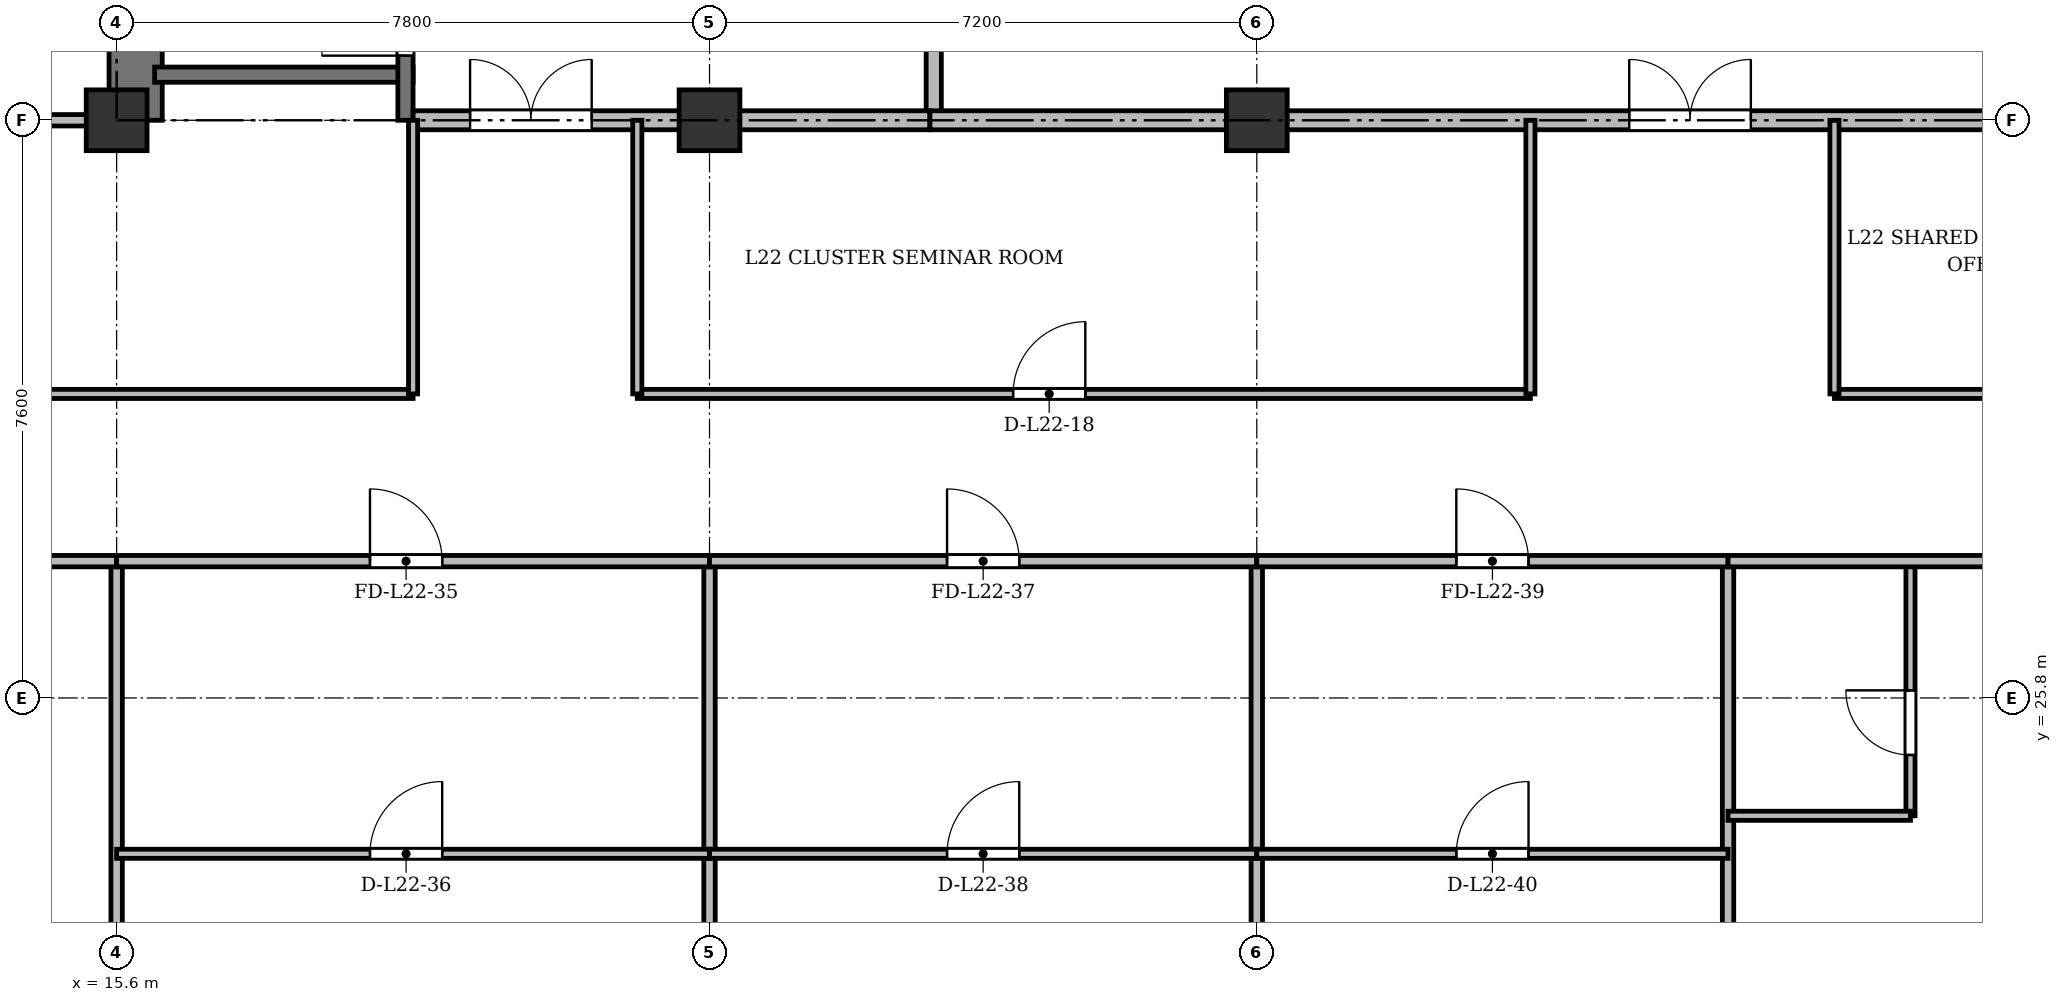
"""IFC4 building model, lengths in metres.
Left out: names, types, materials, properties, quantities, classifications, styles, units other than length and angle.
Written with IfcOpenShell. Run it as: python <this file> out.ifc"""

import sys

from ifc_helpers import new_model, si_unit, direction, frame, frame_2d, origin, origin_2d, place, context, subcontext, project, spatial, rectangle, extrude, source, transform, mapped, element, fill, save


model = new_model("IFC4")
c1 = context("Model", 3, precision=1e-05, world=origin(), true_north=direction((0.0, 1.0)))
c2 = subcontext(c1, "Body", "Model", "MODEL_VIEW")
j1 = project(units=[si_unit("LENGTHUNIT", "METRE"), si_unit("PLANEANGLEUNIT", "RADIAN")], contexts=[c1])
p1 = place(None, origin())
s1 = spatial("IfcSite", under=j1, at=p1, CompositionType="ELEMENT")
p2 = place(p1, origin())
s2 = spatial("IfcBuilding", under=s1, at=p2, CompositionType="ELEMENT")
p3 = place(p2, frame((0.0, 0.0, 88.9)))
s3 = spatial("IfcBuildingStorey", under=s2, at=p3, CompositionType="ELEMENT", Elevation=88.9)
m1 = source(origin(), c2, "Body", "SweptSolid", [
    extrude(rectangle(XDim=0.8, YDim=0.8, at=origin_2d()), origin(), (0.0, 0.0, 1.0), 3.6),
])
for number, where, z_axis, x_axis in (
    (1, (15.6, 33.4, 0.0), (0.0, 0.0, 1.0), (1.0, 0.0, 0.0)),
    (2, (23.4, 33.4, 0.0), (0.0, 0.0, 1.0), (1.0, 0.0, 0.0)),
    (3, (30.6, 33.4, 0.0), (0.0, 0.0, 1.0), (1.0, 0.0, 0.0)),
):
    element("IfcColumn", number, at=place(p3, frame(where, z_axis=z_axis, x_axis=x_axis)), inside=s3, PredefinedType="COLUMN", context=c2, shape_type="MappedRepresentation", body=[
        mapped(m1, transform((0.0, 0.0, 0.0), x_axis=(1.0, 0.0, 0.0), y_axis=(0.0, 1.0, 0.0), z_axis=(0.0, 0.0, 1.0), scale=1.0)),
    ])
p4 = place(p3, frame((15.85, 33.4, 0.0), z_axis=(0.0, 0.0, 1.0), x_axis=(0.0, 1.0, 0.0)))
e4 = element("IfcWall", 4, at=p4, inside=s3, PredefinedType="SHEAR", context=c2, shape_type="SweptSolid", body=[
    extrude(rectangle(XDim=11.7, YDim=0.7, at=frame_2d((5.85, 0.0))), origin(), (0.0, 0.0, 1.0), 3.34),
])
p5 = place(p3, frame((16.1, 34.0, 0.0), z_axis=(0.0, 0.0, 1.0), x_axis=(1.0, 0.0, 0.0)))
e5 = element("IfcWall", 5, at=p5, inside=s3, PredefinedType="SHEAR", context=c2, shape_type="SweptSolid", body=[
    extrude(rectangle(XDim=3.4, YDim=0.2, at=frame_2d((1.7, 0.0))), origin(), (0.0, 0.0, 1.0), 3.34),
])
p6 = place(p3, frame((19.4, 33.4, 0.0), z_axis=(0.0, 0.0, 1.0), x_axis=(0.0, 1.0, 0.0)))
e6 = element("IfcWall", 6, at=p6, inside=s3, PredefinedType="SHEAR", context=c2, shape_type="SweptSolid", body=[
    extrude(rectangle(XDim=11.1, YDim=0.2, at=frame_2d((5.55, 0.0))), origin(), (0.0, 0.0, 1.0), 3.34),
])
p7 = place(p6, frame((0.85, 0.0, 0.0)))
e7 = element("IfcOpeningElement", 7, at=p7, cuts=e6, PredefinedType="OPENING", context=c2, shape_type="SweptSolid", body=[
    extrude(rectangle(XDim=1.1, YDim=2.15, at=frame_2d((0.55, 1.075))), frame((0.0, 0.11, 0.0), z_axis=(0.0, -1.0, 0.0), x_axis=(1.0, 0.0, 0.0)), (0.0, 0.0, 1.0), 0.22),
])
p8 = place(p3, frame((26.35, 33.4, 0.0), z_axis=(0.0, 0.0, 1.0), x_axis=(0.0, 1.0, 0.0)))
e8 = element("IfcWall", 8, at=p8, inside=s3, PredefinedType="SOLIDWALL", context=c2, shape_type="SweptSolid", body=[
    extrude(rectangle(XDim=11.3, YDim=0.2, at=frame_2d((5.65, 0.0))), origin(), (0.0, 0.0, 1.0), 2.752),
])
p9 = place(p3, frame((19.5, 33.4, 0.0), z_axis=(0.0, 0.0, 1.0), x_axis=(1.0, 0.0, 0.0)))
e9 = element("IfcWall", 9, at=p9, inside=s3, PredefinedType="PARTITIONING", context=c2, shape_type="SweptSolid", body=[
    extrude(rectangle(XDim=6.8, YDim=0.25, at=frame_2d((3.4, 0.0))), origin(), (0.0, 0.0, 1.0), 2.752),
])
p10 = place(p9, frame((0.75, 0.0, 0.0)))
e10 = element("IfcOpeningElement", 10, at=p10, cuts=e9, PredefinedType="OPENING", context=c2, shape_type="SweptSolid", body=[
    extrude(rectangle(XDim=1.6, YDim=2.2, at=frame_2d((0.8, 1.1))), frame((0.0, 0.135, 0.0), z_axis=(0.0, -1.0, 0.0), x_axis=(1.0, 0.0, 0.0)), (0.0, 0.0, 1.0), 0.27),
])
p11 = place(p3, frame((26.3, 33.4, 0.0), z_axis=(0.0, 0.0, 1.0), x_axis=(1.0, 0.0, 0.0)))
e11 = element("IfcWall", 11, at=p11, inside=s3, PredefinedType="PARTITIONING", context=c2, shape_type="SweptSolid", body=[
    extrude(rectangle(XDim=20.85, YDim=0.25, at=frame_2d((10.425, 0.0))), origin(), (0.0, 0.0, 1.0), 2.752),
])
p12 = place(p11, frame((9.2, 0.0, 0.0)))
e12 = element("IfcOpeningElement", 12, at=p12, cuts=e11, PredefinedType="OPENING", context=c2, shape_type="SweptSolid", body=[
    extrude(rectangle(XDim=1.6, YDim=2.2, at=frame_2d((0.8, 1.1))), frame((0.0, 0.135, 0.0), z_axis=(0.0, -1.0, 0.0), x_axis=(1.0, 0.0, 0.0)), (0.0, 0.0, 1.0), 0.27),
])
p13 = place(p3, frame((4.75, 29.8, 0.0), z_axis=(0.0, 0.0, 1.0), x_axis=(1.0, 0.0, 0.0)))
e13 = element("IfcWall", 13, at=p13, inside=s3, PredefinedType="PARTITIONING", context=c2, shape_type="SweptSolid", body=[
    extrude(rectangle(XDim=14.75, YDim=0.12, at=frame_2d((7.375, 0.0))), origin(), (0.0, 0.0, 1.0), 2.84),
])
p14 = place(p13, frame((6.9, 0.0, 0.0)))
e14 = element("IfcOpeningElement", 14, at=p14, cuts=e13, PredefinedType="OPENING", context=c2, shape_type="SweptSolid", body=[
    extrude(rectangle(XDim=0.95, YDim=2.15, at=frame_2d((0.475, 1.075))), frame((0.0, 0.07, 0.0), z_axis=(0.0, -1.0, 0.0), x_axis=(1.0, 0.0, 0.0)), (0.0, 0.0, 1.0), 0.14),
])
p15 = place(p3, frame((22.45, 29.8, 0.0), z_axis=(0.0, 0.0, 1.0), x_axis=(1.0, 0.0, 0.0)))
e15 = element("IfcWall", 15, at=p15, inside=s3, PredefinedType="PARTITIONING", context=c2, shape_type="SweptSolid", body=[
    extrude(rectangle(XDim=11.75, YDim=0.12, at=frame_2d((5.875, 0.0))), origin(), (0.0, 0.0, 1.0), 2.84),
])
p16 = place(p15, frame((4.944, 0.0, 0.0)))
e16 = element("IfcOpeningElement", 16, at=p16, cuts=e15, PredefinedType="OPENING", context=c2, shape_type="SweptSolid", body=[
    extrude(rectangle(XDim=0.95, YDim=2.15, at=frame_2d((0.475, 1.075))), frame((0.0, 0.07, 0.0), z_axis=(0.0, -1.0, 0.0), x_axis=(1.0, 0.0, 0.0)), (0.0, 0.0, 1.0), 0.14),
])
p17 = place(p3, frame((38.2, 29.8, 0.0), z_axis=(0.0, 0.0, 1.0), x_axis=(1.0, 0.0, 0.0)))
e17 = element("IfcWall", 17, at=p17, inside=s3, PredefinedType="PARTITIONING", context=c2, shape_type="SweptSolid", body=[
    extrude(rectangle(XDim=8.6, YDim=0.12, at=frame_2d((4.3, 0.0))), origin(), (0.0, 0.0, 1.0), 2.84),
])
p18 = place(p17, frame((3.462, 0.0, 0.0)))
e18 = element("IfcOpeningElement", 18, at=p18, cuts=e17, PredefinedType="OPENING", context=c2, shape_type="SweptSolid", body=[
    extrude(rectangle(XDim=0.95, YDim=2.15, at=frame_2d((0.475, 1.075))), frame((0.0, 0.07, 0.0), z_axis=(0.0, -1.0, 0.0), x_axis=(1.0, 0.0, 0.0)), (0.0, 0.0, 1.0), 0.14),
])
for number, where, z_axis, x_axis in (
    (19, (19.5, 29.8, 0.0), (0.0, 0.0, 1.0), (0.0, 1.0, 0.0)),
    (20, (22.45, 29.8, 0.0), (0.0, 0.0, 1.0), (0.0, 1.0, 0.0)),
    (21, (34.2, 29.8, 0.0), (0.0, 0.0, 1.0), (0.0, 1.0, 0.0)),
    (22, (38.2, 29.8, 0.0), (0.0, 0.0, 1.0), (0.0, 1.0, 0.0)),
):
    element("IfcWall", number, at=place(p3, frame(where, z_axis=z_axis, x_axis=x_axis)), inside=s3, PredefinedType="PARTITIONING", context=c2, shape_type="SweptSolid", body=[
        extrude(rectangle(XDim=3.6, YDim=0.12, at=frame_2d((1.8, 0.0))), origin(), (0.0, 0.0, 1.0), 2.752),
    ])
p19 = place(p3, frame((4.75, 33.4, 0.0), z_axis=(0.0, 0.0, 1.0), x_axis=(1.0, 0.0, 0.0)))
e23 = element("IfcWall", 23, at=p19, inside=s3, PredefinedType="PARTITIONING", context=c2, shape_type="SweptSolid", body=[
    extrude(rectangle(XDim=10.85, YDim=0.15, at=frame_2d((5.425, 0.0))), origin(), (0.0, 0.0, 1.0), 2.752),
])
p20 = place(p19, frame((4.94, 0.0, 0.0)))
e24 = element("IfcOpeningElement", 24, at=p20, cuts=e23, PredefinedType="OPENING", context=c2, shape_type="SweptSolid", body=[
    extrude(rectangle(XDim=0.95, YDim=2.15, at=frame_2d((0.475, 1.075))), frame((0.0, 0.085, 0.0), z_axis=(0.0, -1.0, 0.0), x_axis=(1.0, 0.0, 0.0)), (0.0, 0.0, 1.0), 0.17),
])
for number, where, z_axis, x_axis in (
    (25, (15.6, 3.145, 0.0), (0.0, 0.0, 1.0), (0.0, 1.0, 0.0)),
    (26, (23.4, 3.145, 0.0), (0.0, 0.0, 1.0), (0.0, 1.0, 0.0)),
    (27, (30.6, 3.145, 0.0), (0.0, 0.0, 1.0), (0.0, 1.0, 0.0)),
):
    element("IfcWall", number, at=place(p3, frame(where, z_axis=z_axis, x_axis=x_axis)), inside=s3, PredefinedType="PARTITIONING", context=c2, shape_type="SweptSolid", body=[
        extrude(rectangle(XDim=24.455, YDim=0.15, at=frame_2d((12.228, 0.0))), origin(), (0.0, 0.0, 1.0), 2.84),
    ])
p21 = place(p3, frame((36.8, 3.145, 0.0), z_axis=(0.0, 0.0, 1.0), x_axis=(0.0, 1.0, 0.0)))
e28 = element("IfcWall", 28, at=p21, inside=s3, PredefinedType="PARTITIONING", context=c2, shape_type="SweptSolid", body=[
    extrude(rectangle(XDim=24.455, YDim=0.15, at=frame_2d((12.228, 0.0))), origin(), (0.0, 0.0, 1.0), 2.752),
])
p22 = place(p3, frame((10.6, 27.6, 0.0), z_axis=(0.0, 0.0, 1.0), x_axis=(1.0, 0.0, 0.0)))
e29 = element("IfcWall", 29, at=p22, inside=s3, PredefinedType="PARTITIONING", context=c2, shape_type="SweptSolid", body=[
    extrude(rectangle(XDim=5.0, YDim=0.15, at=frame_2d((2.5, 0.0))), origin(), (0.0, 0.0, 1.0), 2.84),
])
p23 = place(p22, frame((2.025, 0.0, 0.0)))
e30 = element("IfcOpeningElement", 30, at=p23, cuts=e29, PredefinedType="OPENING", context=c2, shape_type="SweptSolid", body=[
    extrude(rectangle(XDim=0.95, YDim=2.15, at=frame_2d((0.475, 1.075))), frame((0.0, 0.085, 0.0), z_axis=(0.0, -1.0, 0.0), x_axis=(1.0, 0.0, 0.0)), (0.0, 0.0, 1.0), 0.17),
])
p24 = place(p3, frame((15.6, 27.6, 0.0), z_axis=(0.0, 0.0, 1.0), x_axis=(1.0, 0.0, 0.0)))
e31 = element("IfcWall", 31, at=p24, inside=s3, PredefinedType="PARTITIONING", context=c2, shape_type="SweptSolid", body=[
    extrude(rectangle(XDim=7.8, YDim=0.15, at=frame_2d((3.9, 0.0))), origin(), (0.0, 0.0, 1.0), 2.84),
])
p25 = place(p24, frame((3.333, 0.0, 0.0)))
e32 = element("IfcOpeningElement", 32, at=p25, cuts=e31, PredefinedType="OPENING", context=c2, shape_type="SweptSolid", body=[
    extrude(rectangle(XDim=0.95, YDim=2.15, at=frame_2d((0.475, 1.075))), frame((0.0, 0.085, 0.0), z_axis=(0.0, -1.0, 0.0), x_axis=(1.0, 0.0, 0.0)), (0.0, 0.0, 1.0), 0.17),
])
p26 = place(p3, frame((15.6, 23.75, 0.0), z_axis=(0.0, 0.0, 1.0), x_axis=(1.0, 0.0, 0.0)))
e33 = element("IfcWall", 33, at=p26, inside=s3, PredefinedType="PARTITIONING", context=c2, shape_type="SweptSolid", body=[
    extrude(rectangle(XDim=7.8, YDim=0.12, at=frame_2d((3.9, 0.0))), origin(), (0.0, 0.0, 1.0), 2.84),
])
p27 = place(p26, frame((3.333, 0.0, 0.0)))
e34 = element("IfcOpeningElement", 34, at=p27, cuts=e33, PredefinedType="OPENING", context=c2, shape_type="SweptSolid", body=[
    extrude(rectangle(XDim=0.95, YDim=2.15, at=frame_2d((0.475, 1.075))), frame((0.0, 0.07, 0.0), z_axis=(0.0, -1.0, 0.0), x_axis=(1.0, 0.0, 0.0)), (0.0, 0.0, 1.0), 0.14),
])
p28 = place(p3, frame((23.4, 27.6, 0.0), z_axis=(0.0, 0.0, 1.0), x_axis=(1.0, 0.0, 0.0)))
e35 = element("IfcWall", 35, at=p28, inside=s3, PredefinedType="PARTITIONING", context=c2, shape_type="SweptSolid", body=[
    extrude(rectangle(XDim=7.2, YDim=0.15, at=frame_2d((3.6, 0.0))), origin(), (0.0, 0.0, 1.0), 2.84),
])
p29 = place(p28, frame((3.125, 0.0, 0.0)))
e36 = element("IfcOpeningElement", 36, at=p29, cuts=e35, PredefinedType="OPENING", context=c2, shape_type="SweptSolid", body=[
    extrude(rectangle(XDim=0.95, YDim=2.15, at=frame_2d((0.475, 1.075))), frame((0.0, 0.085, 0.0), z_axis=(0.0, -1.0, 0.0), x_axis=(1.0, 0.0, 0.0)), (0.0, 0.0, 1.0), 0.17),
])
p30 = place(p3, frame((23.4, 23.75, 0.0), z_axis=(0.0, 0.0, 1.0), x_axis=(1.0, 0.0, 0.0)))
e37 = element("IfcWall", 37, at=p30, inside=s3, PredefinedType="PARTITIONING", context=c2, shape_type="SweptSolid", body=[
    extrude(rectangle(XDim=7.2, YDim=0.12, at=frame_2d((3.6, 0.0))), origin(), (0.0, 0.0, 1.0), 2.84),
])
p31 = place(p30, frame((3.125, 0.0, 0.0)))
e38 = element("IfcOpeningElement", 38, at=p31, cuts=e37, PredefinedType="OPENING", context=c2, shape_type="SweptSolid", body=[
    extrude(rectangle(XDim=0.95, YDim=2.15, at=frame_2d((0.475, 1.075))), frame((0.0, 0.07, 0.0), z_axis=(0.0, -1.0, 0.0), x_axis=(1.0, 0.0, 0.0)), (0.0, 0.0, 1.0), 0.14),
])
p32 = place(p3, frame((30.6, 27.6, 0.0), z_axis=(0.0, 0.0, 1.0), x_axis=(1.0, 0.0, 0.0)))
e39 = element("IfcWall", 39, at=p32, inside=s3, PredefinedType="PARTITIONING", context=c2, shape_type="SweptSolid", body=[
    extrude(rectangle(XDim=6.2, YDim=0.15, at=frame_2d((3.1, 0.0))), origin(), (0.0, 0.0, 1.0), 2.84),
])
p33 = place(p32, frame((2.625, 0.0, 0.0)))
e40 = element("IfcOpeningElement", 40, at=p33, cuts=e39, PredefinedType="OPENING", context=c2, shape_type="SweptSolid", body=[
    extrude(rectangle(XDim=0.95, YDim=2.15, at=frame_2d((0.475, 1.075))), frame((0.0, 0.085, 0.0), z_axis=(0.0, -1.0, 0.0), x_axis=(1.0, 0.0, 0.0)), (0.0, 0.0, 1.0), 0.17),
])
p34 = place(p3, frame((30.6, 23.75, 0.0), z_axis=(0.0, 0.0, 1.0), x_axis=(1.0, 0.0, 0.0)))
e41 = element("IfcWall", 41, at=p34, inside=s3, PredefinedType="PARTITIONING", context=c2, shape_type="SweptSolid", body=[
    extrude(rectangle(XDim=6.2, YDim=0.12, at=frame_2d((3.1, 0.0))), origin(), (0.0, 0.0, 1.0), 2.84),
])
p35 = place(p34, frame((2.625, 0.0, 0.0)))
e42 = element("IfcOpeningElement", 42, at=p35, cuts=e41, PredefinedType="OPENING", context=c2, shape_type="SweptSolid", body=[
    extrude(rectangle(XDim=0.95, YDim=2.15, at=frame_2d((0.475, 1.075))), frame((0.0, 0.07, 0.0), z_axis=(0.0, -1.0, 0.0), x_axis=(1.0, 0.0, 0.0)), (0.0, 0.0, 1.0), 0.14),
])
p36 = place(p3, frame((39.2, 24.25, 0.0), z_axis=(0.0, 0.0, 1.0), x_axis=(0.0, 1.0, 0.0)))
e43 = element("IfcWall", 43, at=p36, inside=s3, PredefinedType="PARTITIONING", context=c2, shape_type="SweptSolid", body=[
    extrude(rectangle(XDim=3.35, YDim=0.12, at=frame_2d((1.675, 0.0))), origin(), (0.0, 0.0, 1.0), 2.99),
])
p37 = place(p36, frame((0.8, 0.0, 0.0)))
e44 = element("IfcOpeningElement", 44, at=p37, cuts=e43, PredefinedType="OPENING", context=c2, shape_type="SweptSolid", body=[
    extrude(rectangle(XDim=0.85, YDim=2.1, at=frame_2d((0.425, 1.05))), frame((0.0, 0.07, 0.0), z_axis=(0.0, -1.0, 0.0), x_axis=(1.0, 0.0, 0.0)), (0.0, 0.0, 1.0), 0.14),
])
p38 = place(p3, frame((36.8, 24.25, 0.0), z_axis=(0.0, 0.0, 1.0), x_axis=(1.0, 0.0, 0.0)))
e45 = element("IfcWall", 45, at=p38, inside=s3, PredefinedType="PARTITIONING", context=c2, shape_type="SweptSolid", body=[
    extrude(rectangle(XDim=2.4, YDim=0.12, at=frame_2d((1.2, 0.0))), origin(), (0.0, 0.0, 1.0), 3.34),
])
p39 = place(p3, frame((36.8, 27.6, 0.0), z_axis=(0.0, 0.0, 1.0), x_axis=(1.0, 0.0, 0.0)))
e46 = element("IfcWall", 46, at=p39, inside=s3, PredefinedType="PARTITIONING", context=c2, shape_type="SweptSolid", body=[
    extrude(rectangle(XDim=7.0, YDim=0.15, at=frame_2d((3.5, 0.0))), origin(), (0.0, 0.0, 1.0), 2.84),
])
p40 = place(p39, frame((4.7, 0.0, 0.0)))
e47 = element("IfcOpeningElement", 47, at=p40, cuts=e46, PredefinedType="OPENING", context=c2, shape_type="SweptSolid", body=[
    extrude(rectangle(XDim=0.95, YDim=2.15, at=frame_2d((0.475, 1.075))), frame((0.0, 0.085, 0.0), z_axis=(0.0, -1.0, 0.0), x_axis=(1.0, 0.0, 0.0)), (0.0, 0.0, 1.0), 0.17),
])
m2 = source(origin(), c2, "Body", "SweptSolid", [
    extrude(rectangle(XDim=1.1, YDim=2.15, at=frame_2d((0.55, 1.075))), frame((0.0, 0.025, 0.0), z_axis=(0.0, -1.0, 0.0), x_axis=(1.0, 0.0, 0.0)), (0.0, 0.0, 1.0), 0.05),
])
p41 = place(p7, origin())
e48 = element("IfcDoor", 48, at=p41, inside=s3, OperationType="SINGLE_SWING_LEFT", PredefinedType="DOOR", context=c2, shape_type="MappedRepresentation", body=[
    mapped(m2, transform((0.0, 0.0, 0.0), x_axis=(1.0, 0.0, 0.0), y_axis=(0.0, 1.0, 0.0), z_axis=(0.0, 0.0, 1.0), scale=1.0)),
])
fill(e7, e48)
m3 = source(origin(), c2, "Body", "SweptSolid", [
    extrude(rectangle(XDim=1.6, YDim=2.2, at=frame_2d((0.8, 1.1))), frame((0.0, 0.025, 0.0), z_axis=(0.0, -1.0, 0.0), x_axis=(1.0, 0.0, 0.0)), (0.0, 0.0, 1.0), 0.05),
])
p42 = place(p10, origin())
e49 = element("IfcDoor", 49, at=p42, inside=s3, OperationType="DOUBLE_DOOR_SINGLE_SWING", PredefinedType="DOOR", context=c2, shape_type="MappedRepresentation", body=[
    mapped(m3, transform((0.0, 0.0, 0.0), x_axis=(1.0, 0.0, 0.0), y_axis=(0.0, 1.0, 0.0), z_axis=(0.0, 0.0, 1.0), scale=1.0)),
])
fill(e10, e49)
p43 = place(p12, origin())
e50 = element("IfcDoor", 50, at=p43, inside=s3, OperationType="DOUBLE_DOOR_SINGLE_SWING", PredefinedType="DOOR", context=c2, shape_type="MappedRepresentation", body=[
    mapped(m3, transform((0.0, 0.0, 0.0), x_axis=(1.0, 0.0, 0.0), y_axis=(0.0, 1.0, 0.0), z_axis=(0.0, 0.0, 1.0), scale=1.0)),
])
fill(e12, e50)
m4 = source(origin(), c2, "Body", "SweptSolid", [
    extrude(rectangle(XDim=0.95, YDim=2.15, at=frame_2d((0.475, 1.075))), frame((0.0, 0.025, 0.0), z_axis=(0.0, -1.0, 0.0), x_axis=(1.0, 0.0, 0.0)), (0.0, 0.0, 1.0), 0.05),
])
p44 = place(p16, origin())
e51 = element("IfcDoor", 51, at=p44, inside=s3, OperationType="SINGLE_SWING_RIGHT", PredefinedType="DOOR", context=c2, shape_type="MappedRepresentation", body=[
    mapped(m4, transform((0.0, 0.0, 0.0), x_axis=(1.0, 0.0, 0.0), y_axis=(0.0, 1.0, 0.0), z_axis=(0.0, 0.0, 1.0), scale=1.0)),
])
fill(e16, e51)
p45 = place(p25, origin())
e52 = element("IfcDoor", 52, at=p45, inside=s3, OperationType="SINGLE_SWING_LEFT", PredefinedType="DOOR", context=c2, shape_type="MappedRepresentation", body=[
    mapped(m4, transform((0.0, 0.0, 0.0), x_axis=(1.0, 0.0, 0.0), y_axis=(0.0, 1.0, 0.0), z_axis=(0.0, 0.0, 1.0), scale=1.0)),
])
fill(e32, e52)
p46 = place(p27, origin())
e53 = element("IfcDoor", 53, at=p46, inside=s3, OperationType="SINGLE_SWING_RIGHT", PredefinedType="DOOR", context=c2, shape_type="MappedRepresentation", body=[
    mapped(m4, transform((0.0, 0.0, 0.0), x_axis=(1.0, 0.0, 0.0), y_axis=(0.0, 1.0, 0.0), z_axis=(0.0, 0.0, 1.0), scale=1.0)),
])
fill(e34, e53)
p47 = place(p29, origin())
e54 = element("IfcDoor", 54, at=p47, inside=s3, OperationType="SINGLE_SWING_LEFT", PredefinedType="DOOR", context=c2, shape_type="MappedRepresentation", body=[
    mapped(m4, transform((0.0, 0.0, 0.0), x_axis=(1.0, 0.0, 0.0), y_axis=(0.0, 1.0, 0.0), z_axis=(0.0, 0.0, 1.0), scale=1.0)),
])
fill(e36, e54)
p48 = place(p31, origin())
e55 = element("IfcDoor", 55, at=p48, inside=s3, OperationType="SINGLE_SWING_RIGHT", PredefinedType="DOOR", context=c2, shape_type="MappedRepresentation", body=[
    mapped(m4, transform((0.0, 0.0, 0.0), x_axis=(1.0, 0.0, 0.0), y_axis=(0.0, 1.0, 0.0), z_axis=(0.0, 0.0, 1.0), scale=1.0)),
])
fill(e38, e55)
p49 = place(p33, origin())
e56 = element("IfcDoor", 56, at=p49, inside=s3, OperationType="SINGLE_SWING_LEFT", PredefinedType="DOOR", context=c2, shape_type="MappedRepresentation", body=[
    mapped(m4, transform((0.0, 0.0, 0.0), x_axis=(1.0, 0.0, 0.0), y_axis=(0.0, 1.0, 0.0), z_axis=(0.0, 0.0, 1.0), scale=1.0)),
])
fill(e40, e56)
p50 = place(p35, origin())
e57 = element("IfcDoor", 57, at=p50, inside=s3, OperationType="SINGLE_SWING_RIGHT", PredefinedType="DOOR", context=c2, shape_type="MappedRepresentation", body=[
    mapped(m4, transform((0.0, 0.0, 0.0), x_axis=(1.0, 0.0, 0.0), y_axis=(0.0, 1.0, 0.0), z_axis=(0.0, 0.0, 1.0), scale=1.0)),
])
fill(e42, e57)
m5 = source(origin(), c2, "Body", "SweptSolid", [
    extrude(rectangle(XDim=0.85, YDim=2.1, at=frame_2d((0.425, 1.05))), frame((0.0, 0.025, 0.0), z_axis=(0.0, -1.0, 0.0), x_axis=(1.0, 0.0, 0.0)), (0.0, 0.0, 1.0), 0.05),
])
p51 = place(p37, origin())
e58 = element("IfcDoor", 58, at=p51, inside=s3, OperationType="SINGLE_SWING_RIGHT", PredefinedType="DOOR", context=c2, shape_type="MappedRepresentation", body=[
    mapped(m5, transform((0.0, 0.0, 0.0), x_axis=(1.0, 0.0, 0.0), y_axis=(0.0, 1.0, 0.0), z_axis=(0.0, 0.0, 1.0), scale=1.0)),
])
fill(e44, e58)
save(model, sys.argv[1])
